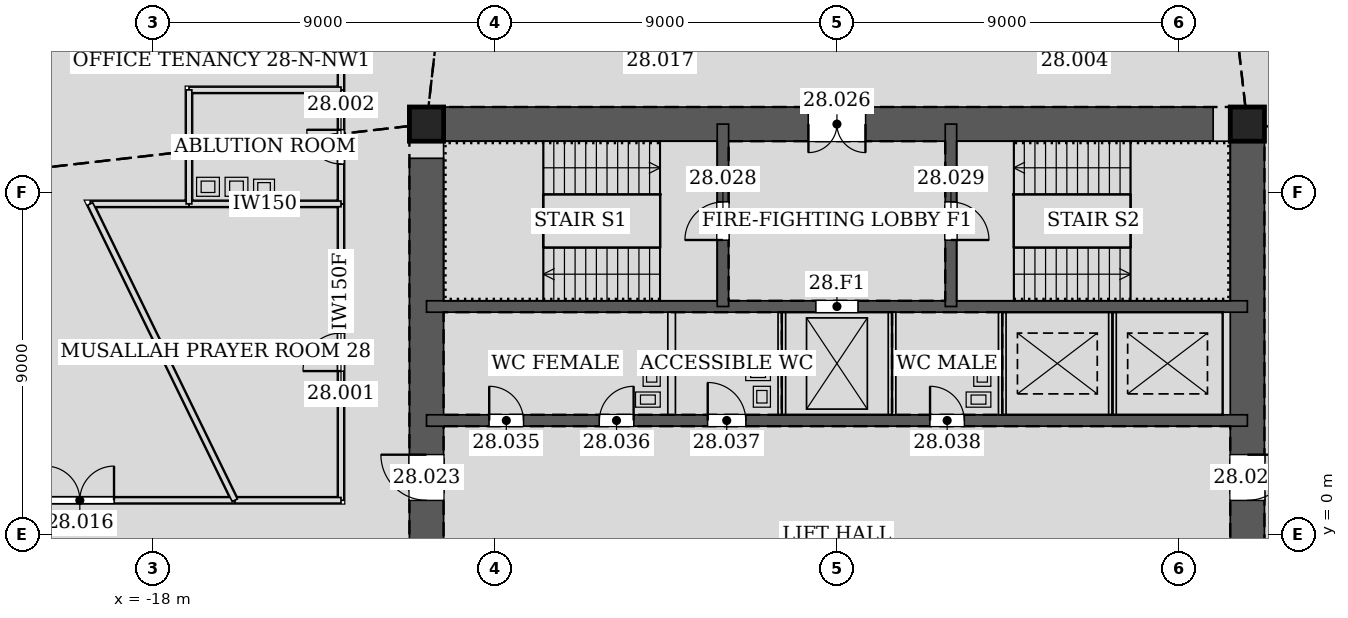
"""IFC4 building model, lengths in metres.
Left out: names, types, materials, properties, quantities, classifications, styles, units other than length and angle.
Written with IfcOpenShell. Run it as: python <this file> out.ifc"""

import sys

from ifc_helpers import new_model, si_unit, direction, frame, frame_2d, origin, origin_2d, place, context, subcontext, project, spatial, rectangle, hollow_rectangle, extrude, element, fill, save


model = new_model("IFC4")
c1 = context("Model", 3, precision=1e-05, world=origin(), true_north=direction((0.0, 1.0)))
c2 = subcontext(c1, "Body", "Model", "MODEL_VIEW")
j1 = project(units=[si_unit("LENGTHUNIT", "METRE"), si_unit("PLANEANGLEUNIT", "RADIAN")], contexts=[c1])
p1 = place(None, origin())
s1 = spatial("IfcSite", under=j1, at=p1, CompositionType="ELEMENT")
p2 = place(p1, origin())
s2 = spatial("IfcBuilding", under=s1, at=p2, CompositionType="ELEMENT")
p3 = place(p2, frame((0.0, 0.0, 126.0)))
s3 = spatial("IfcBuildingStorey", under=s2, at=p3, CompositionType="ELEMENT", Elevation=126.0)
for number, where, z_axis, x_axis in (
    (1, (10.8, 10.8, 0.0), (0.0, 0.0, 1.0), (1.0, 0.0, 0.0)),
    (2, (-10.8, 10.8, 0.0), (0.0, 0.0, 1.0), (1.0, 0.0, 0.0)),
):
    element("IfcColumn", number, at=place(p3, frame(where, z_axis=z_axis, x_axis=x_axis)), inside=s3, PredefinedType="COLUMN", context=c2, shape_type="SweptSolid", body=[
        extrude(hollow_rectangle(XDim=0.9, YDim=0.9, WallThickness=0.06, at=origin_2d()), origin(), (0.0, 0.0, 1.0), 4.2),
    ])
p4 = place(p3, frame((10.8, -10.8, 0.0), z_axis=(0.0, 0.0, 1.0), x_axis=(0.0, 1.0, 0.0)))
e3 = element("IfcWall", 3, at=p4, inside=s3, PredefinedType="SOLIDWALL", context=c2, shape_type="SweptSolid", body=[
    extrude(rectangle(XDim=21.6, YDim=0.9, at=frame_2d((10.8, 0.0))), origin(), (0.0, 0.0, 1.0), 4.2),
])
p5 = place(p4, frame((11.7, 0.0, 0.0)))
e4 = element("IfcOpeningElement", 4, at=p5, cuts=e3, PredefinedType="OPENING", context=c2, shape_type="SweptSolid", body=[
    extrude(rectangle(XDim=1.2, YDim=2.1, at=frame_2d((0.6, 1.05))), frame((0.0, 0.46, 0.0), z_axis=(0.0, -1.0, 0.0), x_axis=(1.0, 0.0, 0.0)), (0.0, 0.0, 1.0), 0.92),
])
p6 = place(p4, frame((8.7, 0.0, 0.0)))
e5 = element("IfcOpeningElement", 5, at=p6, cuts=e3, PredefinedType="OPENING", context=c2, shape_type="SweptSolid", body=[
    extrude(rectangle(XDim=1.2, YDim=2.1, at=frame_2d((0.6, 1.05))), frame((0.0, 0.46, 0.0), z_axis=(0.0, -1.0, 0.0), x_axis=(1.0, 0.0, 0.0)), (0.0, 0.0, 1.0), 0.92),
])
p7 = place(p3, frame((10.8, 10.8, 0.0), z_axis=(0.0, 0.0, 1.0), x_axis=(-1.0, 0.0, 0.0)))
e6 = element("IfcWall", 6, at=p7, inside=s3, PredefinedType="SOLIDWALL", context=c2, shape_type="SweptSolid", body=[
    extrude(rectangle(XDim=21.6, YDim=0.9, at=frame_2d((10.8, 0.0))), origin(), (0.0, 0.0, 1.0), 4.2),
])
p8 = place(p7, frame((10.05, 0.0, 0.0)))
e7 = element("IfcOpeningElement", 7, at=p8, cuts=e6, PredefinedType="OPENING", context=c2, shape_type="SweptSolid", body=[
    extrude(rectangle(XDim=1.5, YDim=2.1, at=frame_2d((0.75, 1.05))), frame((0.0, 0.46, 0.0), z_axis=(0.0, -1.0, 0.0), x_axis=(1.0, 0.0, 0.0)), (0.0, 0.0, 1.0), 0.92),
])
p9 = place(p3, frame((-10.8, 10.8, 0.0), z_axis=(0.0, 0.0, 1.0), x_axis=(0.0, -1.0, 0.0)))
e8 = element("IfcWall", 8, at=p9, inside=s3, PredefinedType="SOLIDWALL", context=c2, shape_type="SweptSolid", body=[
    extrude(rectangle(XDim=21.6, YDim=0.9, at=frame_2d((10.8, 0.0))), origin(), (0.0, 0.0, 1.0), 4.2),
])
p10 = place(p9, frame((8.7, 0.0, 0.0)))
e9 = element("IfcOpeningElement", 9, at=p10, cuts=e8, PredefinedType="OPENING", context=c2, shape_type="SweptSolid", body=[
    extrude(rectangle(XDim=1.2, YDim=2.1, at=frame_2d((0.6, 1.05))), frame((0.0, 0.46, 0.0), z_axis=(0.0, -1.0, 0.0), x_axis=(1.0, 0.0, 0.0)), (0.0, 0.0, 1.0), 0.92),
])
p11 = place(p9, frame((11.7, 0.0, 0.0)))
e10 = element("IfcOpeningElement", 10, at=p11, cuts=e8, PredefinedType="OPENING", context=c2, shape_type="SweptSolid", body=[
    extrude(rectangle(XDim=1.2, YDim=2.1, at=frame_2d((0.6, 1.05))), frame((0.0, 0.46, 0.0), z_axis=(0.0, -1.0, 0.0), x_axis=(1.0, 0.0, 0.0)), (0.0, 0.0, 1.0), 0.92),
])
p12 = place(p3, frame((-10.8, 3.0, 0.0), z_axis=(0.0, 0.0, 1.0), x_axis=(1.0, 0.0, 0.0)))
e11 = element("IfcWall", 11, at=p12, inside=s3, PredefinedType="SOLIDWALL", context=c2, shape_type="SweptSolid", body=[
    extrude(rectangle(XDim=21.6, YDim=0.3, at=frame_2d((10.8, 0.0))), origin(), (0.0, 0.0, 1.0), 4.2),
])
p13 = place(p12, frame((1.65, 0.0, 0.0)))
e12 = element("IfcOpeningElement", 12, at=p13, cuts=e11, PredefinedType="OPENING", context=c2, shape_type="SweptSolid", body=[
    extrude(rectangle(XDim=0.9, YDim=2.1, at=frame_2d((0.45, 1.05))), frame((0.0, 0.16, 0.0), z_axis=(0.0, -1.0, 0.0), x_axis=(1.0, 0.0, 0.0)), (0.0, 0.0, 1.0), 0.32),
])
p14 = place(p12, frame((4.55, 0.0, 0.0)))
e13 = element("IfcOpeningElement", 13, at=p14, cuts=e11, PredefinedType="OPENING", context=c2, shape_type="SweptSolid", body=[
    extrude(rectangle(XDim=0.9, YDim=2.1, at=frame_2d((0.45, 1.05))), frame((0.0, 0.16, 0.0), z_axis=(0.0, -1.0, 0.0), x_axis=(1.0, 0.0, 0.0)), (0.0, 0.0, 1.0), 0.32),
])
p15 = place(p12, frame((7.4, 0.0, 0.0)))
e14 = element("IfcOpeningElement", 14, at=p15, cuts=e11, PredefinedType="OPENING", context=c2, shape_type="SweptSolid", body=[
    extrude(rectangle(XDim=1.0, YDim=2.1, at=frame_2d((0.5, 1.05))), frame((0.0, 0.16, 0.0), z_axis=(0.0, -1.0, 0.0), x_axis=(1.0, 0.0, 0.0)), (0.0, 0.0, 1.0), 0.32),
])
p16 = place(p12, frame((13.25, 0.0, 0.0)))
e15 = element("IfcOpeningElement", 15, at=p16, cuts=e11, PredefinedType="OPENING", context=c2, shape_type="SweptSolid", body=[
    extrude(rectangle(XDim=0.9, YDim=2.1, at=frame_2d((0.45, 1.05))), frame((0.0, 0.16, 0.0), z_axis=(0.0, -1.0, 0.0), x_axis=(1.0, 0.0, 0.0)), (0.0, 0.0, 1.0), 0.32),
])
p17 = place(p3, frame((-10.8, 6.0, 0.0), z_axis=(0.0, 0.0, 1.0), x_axis=(1.0, 0.0, 0.0)))
e16 = element("IfcWall", 16, at=p17, inside=s3, PredefinedType="SOLIDWALL", context=c2, shape_type="SweptSolid", body=[
    extrude(rectangle(XDim=21.6, YDim=0.3, at=frame_2d((10.8, 0.0))), origin(), (0.0, 0.0, 1.0), 4.2),
])
p18 = place(p17, frame((10.25, 0.0, 0.0)))
e17 = element("IfcOpeningElement", 17, at=p18, cuts=e16, PredefinedType="OPENING", context=c2, shape_type="SweptSolid", body=[
    extrude(rectangle(XDim=1.1, YDim=2.1, at=frame_2d((0.55, 1.05))), frame((0.0, 0.16, 0.0), z_axis=(0.0, -1.0, 0.0), x_axis=(1.0, 0.0, 0.0)), (0.0, 0.0, 1.0), 0.32),
])
p19 = place(p3, frame((-3.0, 6.0, 0.0), z_axis=(0.0, 0.0, 1.0), x_axis=(0.0, 1.0, 0.0)))
e18 = element("IfcWall", 18, at=p19, inside=s3, PredefinedType="SOLIDWALL", context=c2, shape_type="SweptSolid", body=[
    extrude(rectangle(XDim=4.8, YDim=0.3, at=frame_2d((2.4, 0.0))), origin(), (0.0, 0.0, 1.0), 4.2),
])
p20 = place(p19, frame((1.75, 0.0, 0.0)))
e19 = element("IfcOpeningElement", 19, at=p20, cuts=e18, PredefinedType="OPENING", context=c2, shape_type="SweptSolid", body=[
    extrude(rectangle(XDim=1.0, YDim=2.1, at=frame_2d((0.5, 1.05))), frame((0.0, 0.16, 0.0), z_axis=(0.0, -1.0, 0.0), x_axis=(1.0, 0.0, 0.0)), (0.0, 0.0, 1.0), 0.32),
])
p21 = place(p3, frame((3.0, 6.0, 0.0), z_axis=(0.0, 0.0, 1.0), x_axis=(0.0, 1.0, 0.0)))
e20 = element("IfcWall", 20, at=p21, inside=s3, PredefinedType="SOLIDWALL", context=c2, shape_type="SweptSolid", body=[
    extrude(rectangle(XDim=4.8, YDim=0.3, at=frame_2d((2.4, 0.0))), origin(), (0.0, 0.0, 1.0), 4.2),
])
p22 = place(p21, frame((1.75, 0.0, 0.0)))
e21 = element("IfcOpeningElement", 21, at=p22, cuts=e20, PredefinedType="OPENING", context=c2, shape_type="SweptSolid", body=[
    extrude(rectangle(XDim=1.0, YDim=2.1, at=frame_2d((0.5, 1.05))), frame((0.0, 0.16, 0.0), z_axis=(0.0, -1.0, 0.0), x_axis=(1.0, 0.0, 0.0)), (0.0, 0.0, 1.0), 0.32),
])
p23 = place(p3, frame((-13.05, 8.701, 0.0), z_axis=(0.0, 0.0, 1.0), x_axis=(0.0, -1.0, 0.0)))
e22 = element("IfcWall", 22, at=p23, inside=s3, PredefinedType="PARTITIONING", context=c2, shape_type="SweptSolid", body=[
    extrude(rectangle(XDim=7.801, YDim=0.15, at=frame_2d((3.9, 0.0))), origin(), (0.0, 0.0, 1.0), 4.035),
])
p24 = place(p23, frame((3.4, 0.0, 0.0)))
e23 = element("IfcOpeningElement", 23, at=p24, cuts=e22, PredefinedType="OPENING", context=c2, shape_type="SweptSolid", body=[
    extrude(rectangle(XDim=1.0, YDim=2.1, at=frame_2d((0.5, 1.05))), frame((0.0, 0.085, 0.0), z_axis=(0.0, -1.0, 0.0), x_axis=(1.0, 0.0, 0.0)), (0.0, 0.0, 1.0), 0.17),
])
p25 = place(p3, frame((-13.05, 0.9, 0.0), z_axis=(0.0, 0.0, 1.0), x_axis=(-1.0, 0.0, 0.0)))
e24 = element("IfcWall", 24, at=p25, inside=s3, PredefinedType="PARTITIONING", context=c2, shape_type="SweptSolid", body=[
    extrude(rectangle(XDim=2.797, YDim=0.15, at=frame_2d((1.398, 0.0))), origin(), (0.0, 0.0, 1.0), 3.426),
])
p26 = place(p3, frame((-13.05, 11.701, 0.0), z_axis=(0.0, 0.0, 1.0), x_axis=(0.0, -1.0, 0.0)))
e25 = element("IfcWall", 25, at=p26, inside=s3, PredefinedType="PARTITIONING", context=c2, shape_type="SweptSolid", body=[
    extrude(rectangle(XDim=3.002, YDim=0.15, at=frame_2d((1.501, 0.0))), origin(), (0.0, 0.0, 1.0), 3.042),
])
p27 = place(p26, frame((1.051, 0.0, 0.0)))
e26 = element("IfcOpeningElement", 26, at=p27, cuts=e25, PredefinedType="OPENING", context=c2, shape_type="SweptSolid", body=[
    extrude(rectangle(XDim=0.9, YDim=2.1, at=frame_2d((0.45, 1.05))), frame((0.0, 0.085, 0.0), z_axis=(0.0, -1.0, 0.0), x_axis=(1.0, 0.0, 0.0)), (0.0, 0.0, 1.0), 0.17),
])
p28 = place(p3, frame((-15.844, 0.9, 0.0), z_axis=(0.0, 0.0, 1.0), x_axis=(-1.0, 0.0, 0.0)))
e27 = element("IfcWall", 27, at=p28, inside=s3, PredefinedType="PARTITIONING", context=c2, shape_type="SweptSolid", body=[
    extrude(rectangle(XDim=8.59, YDim=0.15, at=frame_2d((4.295, 0.0))), origin(), (0.0, 0.0, 1.0), 3.492),
])
p29 = place(p28, frame((3.178, 0.0, 0.0)))
e28 = element("IfcOpeningElement", 28, at=p29, cuts=e27, PredefinedType="OPENING", context=c2, shape_type="SweptSolid", body=[
    extrude(rectangle(XDim=1.8, YDim=2.4, at=frame_2d((0.9, 1.2))), frame((0.0, 0.085, 0.0), z_axis=(0.0, -1.0, 0.0), x_axis=(1.0, 0.0, 0.0)), (0.0, 0.0, 1.0), 0.17),
])
p30 = place(p3, frame((-13.05, 13.05, 0.0), z_axis=(0.0, 0.0, 1.0), x_axis=(0.0, -1.0, 0.0)))
e29 = element("IfcWall", 29, at=p30, inside=s3, PredefinedType="PARTITIONING", context=c2, shape_type="SweptSolid", body=[
    extrude(rectangle(XDim=1.351, YDim=0.15, at=frame_2d((0.676, 0.0))), origin(), (0.0, 0.0, 1.0), 3.184),
])
p31 = place(p3, frame((-13.05, 8.7, 0.0), z_axis=(0.0, 0.0, 1.0), x_axis=(-1.0, 0.0, 0.0)))
e30 = element("IfcWall", 30, at=p31, inside=s3, PredefinedType="PARTITIONING", context=c2, shape_type="SweptSolid", body=[
    extrude(rectangle(XDim=4.001, YDim=0.15, at=frame_2d((2.0, 0.0))), origin(), (0.0, 0.0, 1.0), 3.426),
])
p32 = place(p3, frame((-17.049, 8.7, 0.0), z_axis=(0.0, 0.0, 1.0), x_axis=(-1.0, 0.0, 0.0)))
e31 = element("IfcWall", 31, at=p32, inside=s3, PredefinedType="PARTITIONING", context=c2, shape_type="SweptSolid", body=[
    extrude(rectangle(XDim=2.601, YDim=0.15, at=frame_2d((1.3, 0.0))), origin(), (0.0, 0.0, 1.0), 3.499),
])
p33 = place(p3, frame((-19.65, 8.7, 0.0), z_axis=(0.0, 0.0, 1.0), x_axis=(0.438358227548, -0.898800347319, 0.0)))
e32 = element("IfcWall", 32, at=p33, inside=s3, PredefinedType="PARTITIONING", context=c2, shape_type="SweptSolid", body=[
    extrude(rectangle(XDim=8.678, YDim=0.15, at=frame_2d((4.339, 0.0))), origin(), (0.0, 0.0, 1.0), 3.499),
])
p34 = place(p3, frame((-13.05, 11.7, 0.0), z_axis=(0.0, 0.0, 1.0), x_axis=(-1.0, 0.0, 0.0)))
e33 = element("IfcWall", 33, at=p34, inside=s3, PredefinedType="PARTITIONING", context=c2, shape_type="SweptSolid", body=[
    extrude(rectangle(XDim=4.0, YDim=0.15, at=frame_2d((2.0, 0.0))), origin(), (0.0, 0.0, 1.0), 3.715),
])
p35 = place(p3, frame((-17.05, 11.7, 0.0), z_axis=(0.0, 0.0, 1.0), x_axis=(0.0, -1.0, 0.0)))
e34 = element("IfcWall", 34, at=p35, inside=s3, PredefinedType="PARTITIONING", context=c2, shape_type="SweptSolid", body=[
    extrude(rectangle(XDim=3.0, YDim=0.15, at=frame_2d((1.5, 0.0))), origin(), (0.0, 0.0, 1.0), 3.042),
])
for number, where, z_axis, x_axis in (
    (35, (-4.35, 3.15, 0.0), (0.0, 0.0, 1.0), (0.0, 1.0, 0.0)),
    (36, (-1.45, 3.15, 0.0), (0.0, 0.0, 1.0), (0.0, 1.0, 0.0)),
    (37, (1.45, 3.15, 0.0), (0.0, 0.0, 1.0), (0.0, 1.0, 0.0)),
    (38, (4.35, 3.15, 0.0), (0.0, 0.0, 1.0), (0.0, 1.0, 0.0)),
):
    element("IfcWall", number, at=place(p3, frame(where, z_axis=z_axis, x_axis=x_axis)), inside=s3, PredefinedType="PARTITIONING", context=c2, shape_type="SweptSolid", body=[
        extrude(rectangle(XDim=2.7, YDim=0.2, at=frame_2d((1.35, 0.0))), origin(), (0.0, 0.0, 1.0), 4.035),
    ])
p36 = place(p3, frame((7.25, 3.15, 0.0), z_axis=(0.0, 0.0, 1.0), x_axis=(0.0, 1.0, 0.0)))
e39 = element("IfcWall", 39, at=p36, inside=s3, PredefinedType="PARTITIONING", context=c2, shape_type="SweptSolid", body=[
    extrude(rectangle(XDim=2.7, YDim=0.2, at=frame_2d((1.35, 0.0))), origin(), (0.0, 0.0, 1.0), 4.2),
])
p37 = place(p24, frame((1.0, 0.0, 0.0), z_axis=(0.0, 0.0, 1.0), x_axis=(-1.0, 0.0, 0.0)))
e40 = element("IfcDoor", 40, at=p37, inside=s3, OperationType="SINGLE_SWING_LEFT", PredefinedType="DOOR", context=c2, shape_type="SweptSolid", body=[
    extrude(rectangle(XDim=1.0, YDim=2.1, at=frame_2d((0.5, 1.05))), frame((0.0, 0.025, 0.0), z_axis=(0.0, -1.0, 0.0), x_axis=(1.0, 0.0, 0.0)), (0.0, 0.0, 1.0), 0.05),
])
fill(e23, e40)
p38 = place(p27, frame((0.9, 0.0, 0.0), z_axis=(0.0, 0.0, 1.0), x_axis=(-1.0, 0.0, 0.0)))
e41 = element("IfcDoor", 41, at=p38, inside=s3, OperationType="SINGLE_SWING_RIGHT", PredefinedType="DOOR", context=c2, shape_type="SweptSolid", body=[
    extrude(rectangle(XDim=0.9, YDim=2.1, at=frame_2d((0.45, 1.05))), frame((0.0, 0.025, 0.0), z_axis=(0.0, -1.0, 0.0), x_axis=(1.0, 0.0, 0.0)), (0.0, 0.0, 1.0), 0.05),
])
fill(e26, e41)
p39 = place(p29, frame((1.8, 0.0, 0.0), z_axis=(0.0, 0.0, 1.0), x_axis=(-1.0, 0.0, 0.0)))
e42 = element("IfcDoor", 42, at=p39, inside=s3, OperationType="DOUBLE_DOOR_SINGLE_SWING", PredefinedType="DOOR", context=c2, shape_type="SweptSolid", body=[
    extrude(rectangle(XDim=1.8, YDim=2.4, at=frame_2d((0.9, 1.2))), frame((0.0, 0.025, 0.0), z_axis=(0.0, -1.0, 0.0), x_axis=(1.0, 0.0, 0.0)), (0.0, 0.0, 1.0), 0.05),
])
fill(e28, e42)
p40 = place(p5, frame((1.2, 0.0, 0.0), z_axis=(0.0, 0.0, 1.0), x_axis=(-1.0, 0.0, 0.0)))
e43 = element("IfcDoor", 43, at=p40, inside=s3, OperationType="SINGLE_SWING_LEFT", PredefinedType="DOOR", context=c2, shape_type="SweptSolid", body=[
    extrude(rectangle(XDim=1.2, YDim=2.1, at=frame_2d((0.6, 1.05))), frame((0.0, 0.025, 0.0), z_axis=(0.0, -1.0, 0.0), x_axis=(1.0, 0.0, 0.0)), (0.0, 0.0, 1.0), 0.05),
])
fill(e4, e43)
p41 = place(p10, frame((1.2, 0.0, 0.0), z_axis=(0.0, 0.0, 1.0), x_axis=(-1.0, 0.0, 0.0)))
e44 = element("IfcDoor", 44, at=p41, inside=s3, OperationType="SINGLE_SWING_RIGHT", PredefinedType="DOOR", context=c2, shape_type="SweptSolid", body=[
    extrude(rectangle(XDim=1.2, YDim=2.1, at=frame_2d((0.6, 1.05))), frame((0.0, 0.025, 0.0), z_axis=(0.0, -1.0, 0.0), x_axis=(1.0, 0.0, 0.0)), (0.0, 0.0, 1.0), 0.05),
])
fill(e9, e44)
p42 = place(p8, origin())
e45 = element("IfcDoor", 45, at=p42, inside=s3, OperationType="DOUBLE_DOOR_SINGLE_SWING", PredefinedType="DOOR", context=c2, shape_type="SweptSolid", body=[
    extrude(rectangle(XDim=1.5, YDim=2.1, at=frame_2d((0.75, 1.05))), frame((0.0, 0.025, 0.0), z_axis=(0.0, -1.0, 0.0), x_axis=(1.0, 0.0, 0.0)), (0.0, 0.0, 1.0), 0.05),
])
fill(e7, e45)
p43 = place(p20, origin())
e46 = element("IfcDoor", 46, at=p43, inside=s3, OperationType="SINGLE_SWING_LEFT", PredefinedType="DOOR", context=c2, shape_type="SweptSolid", body=[
    extrude(rectangle(XDim=1.0, YDim=2.1, at=frame_2d((0.5, 1.05))), frame((0.0, 0.025, 0.0), z_axis=(0.0, -1.0, 0.0), x_axis=(1.0, 0.0, 0.0)), (0.0, 0.0, 1.0), 0.05),
])
fill(e19, e46)
p44 = place(p22, frame((1.0, 0.0, 0.0), z_axis=(0.0, 0.0, 1.0), x_axis=(-1.0, 0.0, 0.0)))
e47 = element("IfcDoor", 47, at=p44, inside=s3, OperationType="SINGLE_SWING_RIGHT", PredefinedType="DOOR", context=c2, shape_type="SweptSolid", body=[
    extrude(rectangle(XDim=1.0, YDim=2.1, at=frame_2d((0.5, 1.05))), frame((0.0, 0.025, 0.0), z_axis=(0.0, -1.0, 0.0), x_axis=(1.0, 0.0, 0.0)), (0.0, 0.0, 1.0), 0.05),
])
fill(e21, e47)
p45 = place(p13, origin())
e48 = element("IfcDoor", 48, at=p45, inside=s3, OperationType="SINGLE_SWING_LEFT", PredefinedType="DOOR", context=c2, shape_type="SweptSolid", body=[
    extrude(rectangle(XDim=0.9, YDim=2.1, at=frame_2d((0.45, 1.05))), frame((0.0, 0.025, 0.0), z_axis=(0.0, -1.0, 0.0), x_axis=(1.0, 0.0, 0.0)), (0.0, 0.0, 1.0), 0.05),
])
fill(e12, e48)
p46 = place(p14, origin())
e49 = element("IfcDoor", 49, at=p46, inside=s3, OperationType="SINGLE_SWING_RIGHT", PredefinedType="DOOR", context=c2, shape_type="SweptSolid", body=[
    extrude(rectangle(XDim=0.9, YDim=2.1, at=frame_2d((0.45, 1.05))), frame((0.0, 0.025, 0.0), z_axis=(0.0, -1.0, 0.0), x_axis=(1.0, 0.0, 0.0)), (0.0, 0.0, 1.0), 0.05),
])
fill(e13, e49)
p47 = place(p15, origin())
e50 = element("IfcDoor", 50, at=p47, inside=s3, OperationType="SINGLE_SWING_LEFT", PredefinedType="DOOR", context=c2, shape_type="SweptSolid", body=[
    extrude(rectangle(XDim=1.0, YDim=2.1, at=frame_2d((0.5, 1.05))), frame((0.0, 0.025, 0.0), z_axis=(0.0, -1.0, 0.0), x_axis=(1.0, 0.0, 0.0)), (0.0, 0.0, 1.0), 0.05),
])
fill(e14, e50)
p48 = place(p16, origin())
e51 = element("IfcDoor", 51, at=p48, inside=s3, OperationType="SINGLE_SWING_LEFT", PredefinedType="DOOR", context=c2, shape_type="SweptSolid", body=[
    extrude(rectangle(XDim=0.9, YDim=2.1, at=frame_2d((0.45, 1.05))), frame((0.0, 0.025, 0.0), z_axis=(0.0, -1.0, 0.0), x_axis=(1.0, 0.0, 0.0)), (0.0, 0.0, 1.0), 0.05),
])
fill(e15, e51)
p49 = place(p18, origin())
e52 = element("IfcDoor", 52, at=p49, inside=s3, OperationType="DOUBLE_DOOR_SLIDING", PredefinedType="DOOR", context=c2, shape_type="SweptSolid", body=[
    extrude(rectangle(XDim=1.1, YDim=2.1, at=frame_2d((0.55, 1.05))), frame((0.0, 0.025, 0.0), z_axis=(0.0, -1.0, 0.0), x_axis=(1.0, 0.0, 0.0)), (0.0, 0.0, 1.0), 0.05),
])
fill(e17, e52)
save(model, sys.argv[1])
